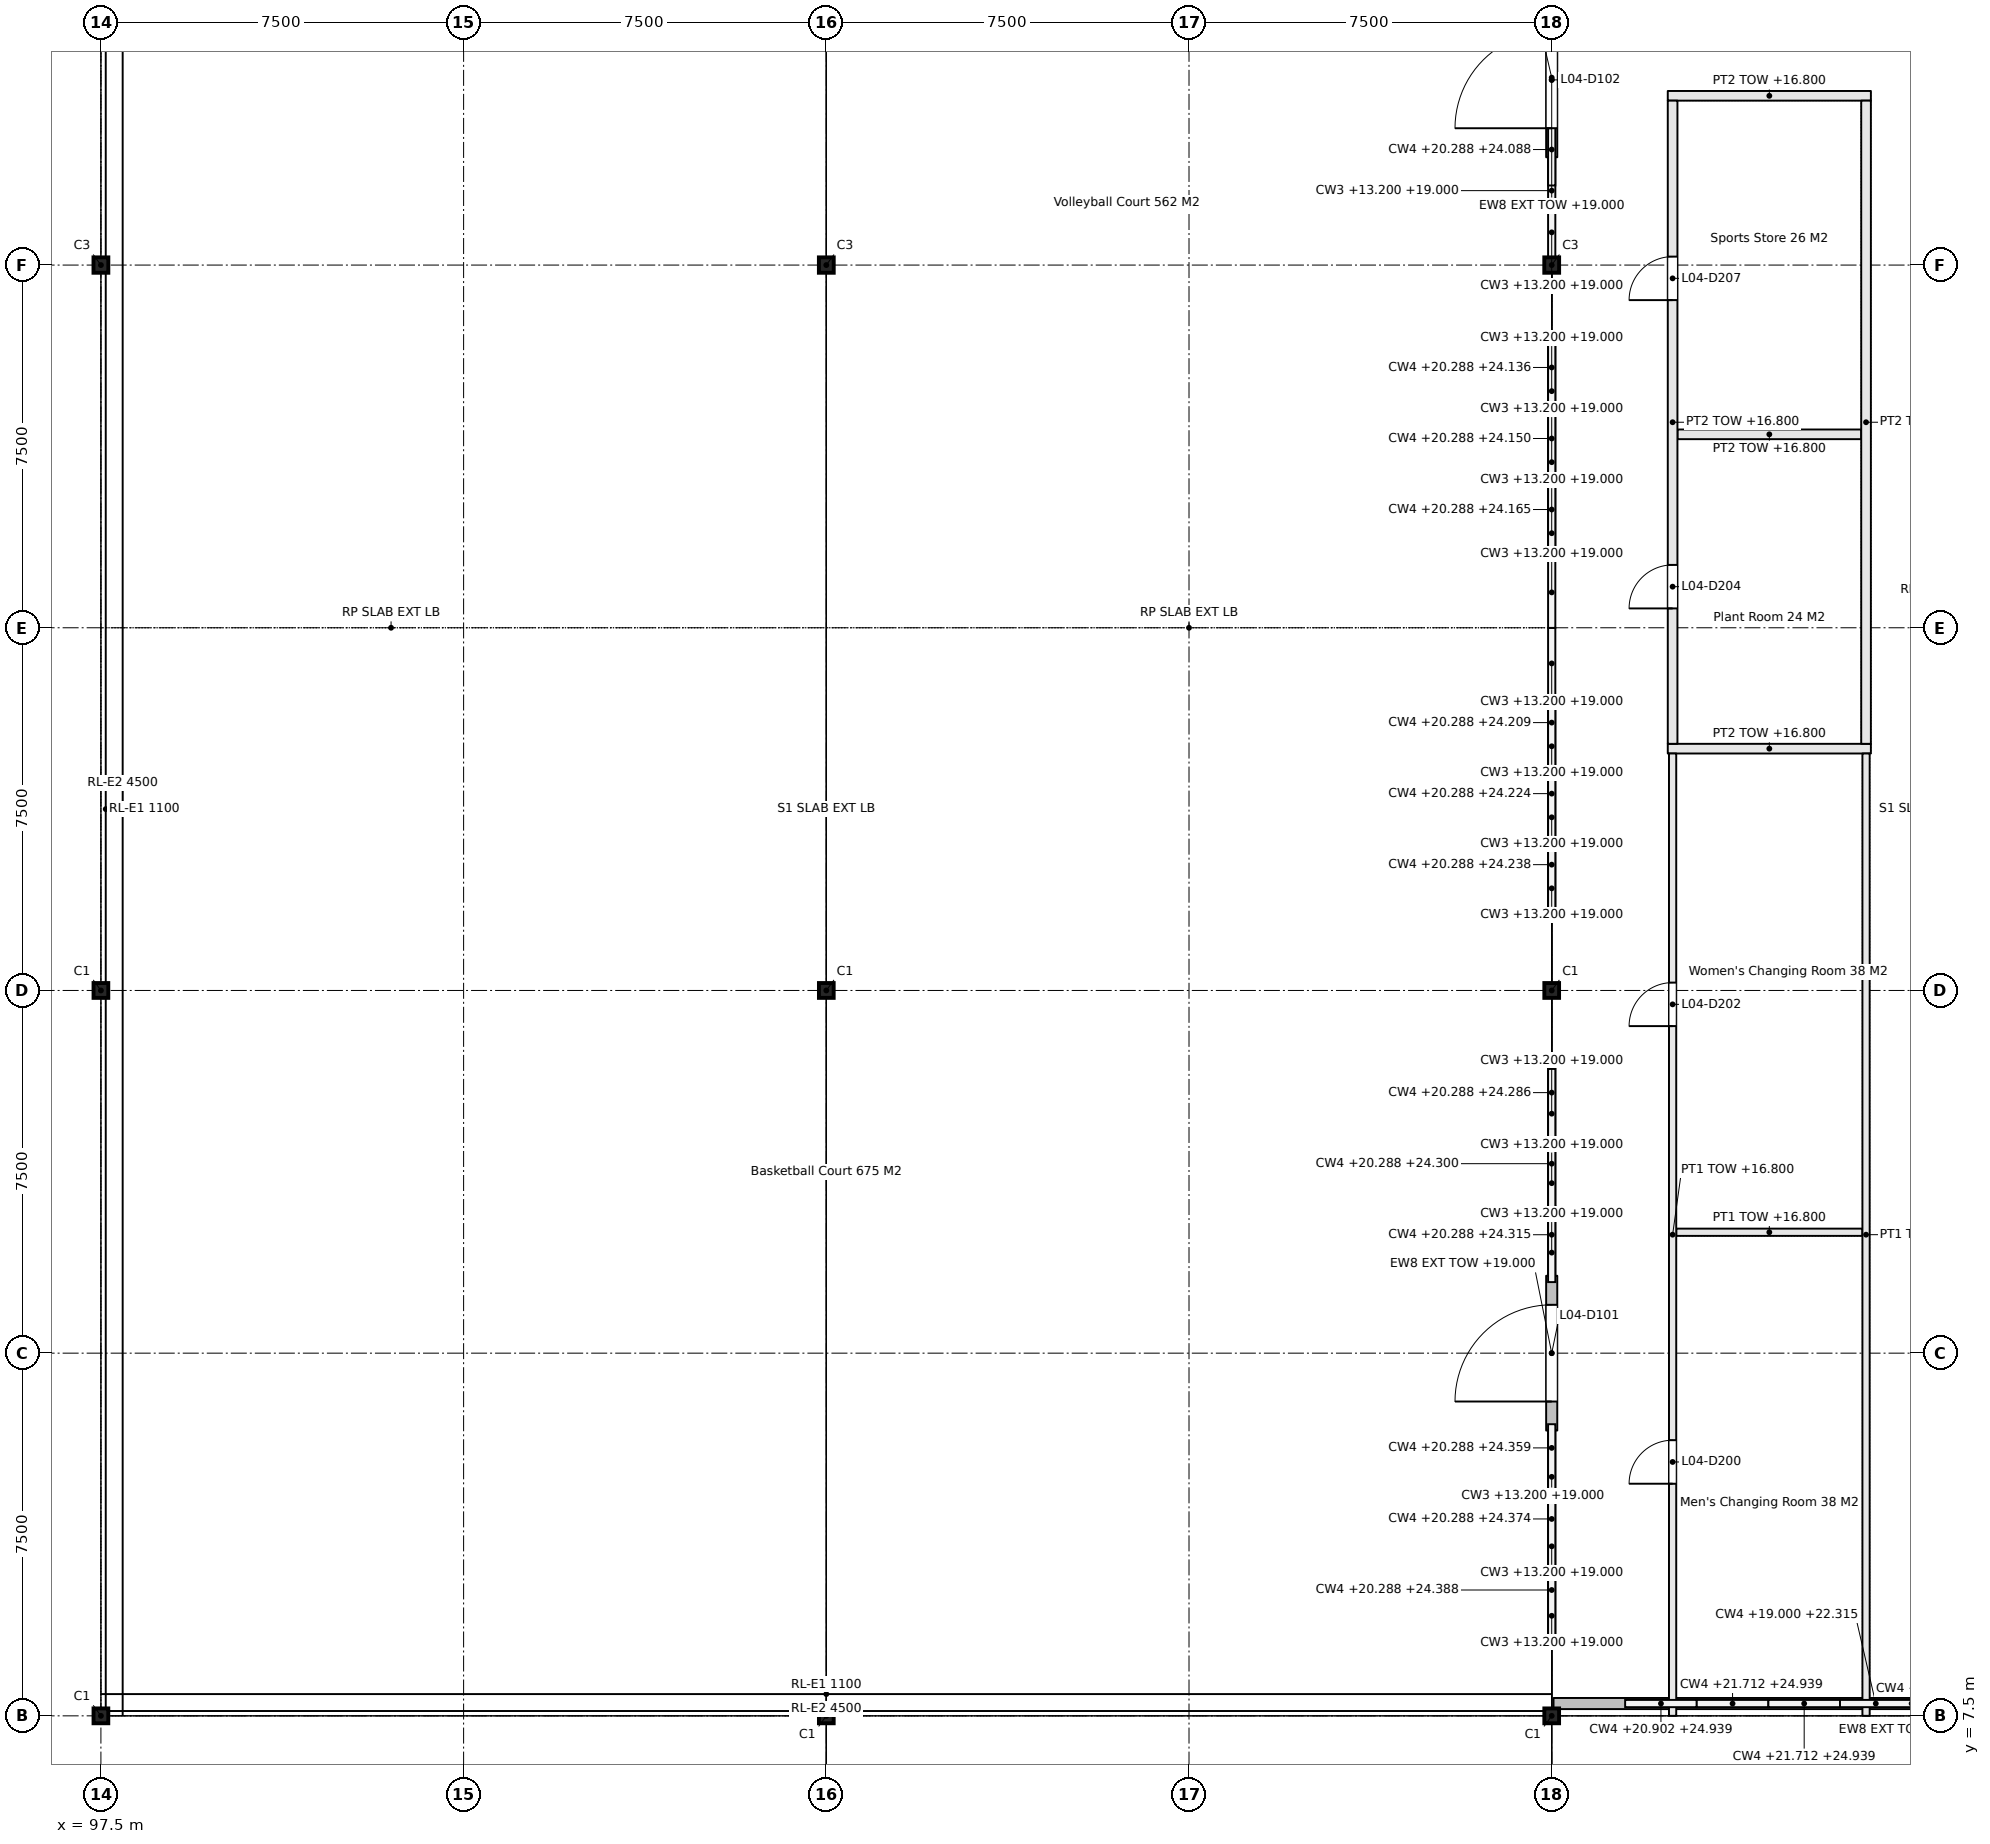
"""IFC4 building model, lengths in metres.
Left out: names, types, materials, properties, quantities, classifications, styles, units other than length and angle.
Written with IfcOpenShell. Run it as: python <this file> out.ifc"""

import sys

from ifc_helpers import new_model, si_unit, direction, frame, frame_2d, origin, origin_2d, place, context, subcontext, project, spatial, rectangle, i_section, extrude, element, fill, save


model = new_model("IFC4")
c1 = context("Model", 3, precision=1e-05, world=origin(), true_north=direction((0.0, 1.0)))
c2 = subcontext(c1, "Body", "Model", "MODEL_VIEW")
j1 = project(units=[si_unit("LENGTHUNIT", "METRE"), si_unit("PLANEANGLEUNIT", "RADIAN")], contexts=[c1])
p1 = place(None, origin())
s1 = spatial("IfcSite", under=j1, at=p1, CompositionType="ELEMENT")
p2 = place(p1, origin())
s2 = spatial("IfcBuilding", under=s1, at=p2, CompositionType="ELEMENT")
p3 = place(p2, frame((0.0, 0.0, 13.2)))
s3 = spatial("IfcBuildingStorey", under=s2, at=p3, CompositionType="ELEMENT", Elevation=13.2)
p4 = place(p3, frame((97.5, 7.5, 0.0), z_axis=(0.0, 0.0, 1.0), x_axis=(1.0, 0.0, 0.0)))
e1 = element("IfcColumn", 1, at=p4, inside=s3, PredefinedType="COLUMN", context=c2, shape_type="SweptSolid", body=[
    extrude(i_section(OverallWidth=0.305, OverallDepth=0.307, WebThickness=0.01, FlangeThickness=0.015, FilletRadius=0.015, at=origin_2d()), origin(), (0.0, 0.0, 1.0), 11.22),
])
p5 = place(p3, frame((97.5, 22.5, 0.0), z_axis=(0.0, 0.0, 1.0), x_axis=(1.0, 0.0, 0.0)))
e2 = element("IfcColumn", 2, at=p5, inside=s3, PredefinedType="COLUMN", context=c2, shape_type="SweptSolid", body=[
    extrude(i_section(OverallWidth=0.305, OverallDepth=0.307, WebThickness=0.01, FlangeThickness=0.015, FilletRadius=0.015, at=origin_2d()), origin(), (0.0, 0.0, 1.0), 11.07),
])
p6 = place(p3, frame((97.5, 37.5, 0.0), z_axis=(0.0, 0.0, 1.0), x_axis=(1.0, 0.0, 0.0)))
e3 = element("IfcColumn", 3, at=p6, inside=s3, PredefinedType="COLUMN", context=c2, shape_type="SweptSolid", body=[
    extrude(i_section(OverallWidth=0.307, OverallDepth=0.318, WebThickness=0.013, FlangeThickness=0.021, FilletRadius=0.015, at=origin_2d()), origin(), (0.0, 0.0, 1.0), 10.92),
])
p7 = place(p3, frame((112.5, 7.5, 0.0), z_axis=(0.0, 0.0, 1.0), x_axis=(1.0, 0.0, 0.0)))
e4 = element("IfcColumn", 4, at=p7, inside=s3, PredefinedType="COLUMN", context=c2, shape_type="SweptSolid", body=[
    extrude(i_section(OverallWidth=0.305, OverallDepth=0.307, WebThickness=0.01, FlangeThickness=0.015, FilletRadius=0.015, at=origin_2d()), origin(), (0.0, 0.0, 1.0), 7.47),
])
p8 = place(p3, frame((112.5, 22.5, 0.0), z_axis=(0.0, 0.0, 1.0), x_axis=(1.0, 0.0, 0.0)))
e5 = element("IfcColumn", 5, at=p8, inside=s3, PredefinedType="COLUMN", context=c2, shape_type="SweptSolid", body=[
    extrude(i_section(OverallWidth=0.305, OverallDepth=0.307, WebThickness=0.01, FlangeThickness=0.015, FilletRadius=0.015, at=origin_2d()), origin(), (0.0, 0.0, 1.0), 7.32),
])
p9 = place(p3, frame((112.5, 37.5, 0.0), z_axis=(0.0, 0.0, 1.0), x_axis=(1.0, 0.0, 0.0)))
e6 = element("IfcColumn", 6, at=p9, inside=s3, PredefinedType="COLUMN", context=c2, shape_type="SweptSolid", body=[
    extrude(i_section(OverallWidth=0.307, OverallDepth=0.318, WebThickness=0.013, FlangeThickness=0.021, FilletRadius=0.015, at=origin_2d()), origin(), (0.0, 0.0, 1.0), 7.17),
])
p10 = place(p3, frame((127.5, 7.5, 0.0), z_axis=(0.0, 0.0, 1.0), x_axis=(1.0, 0.0, 0.0)))
e7 = element("IfcColumn", 7, at=p10, inside=s3, PredefinedType="COLUMN", context=c2, shape_type="SweptSolid", body=[
    extrude(i_section(OverallWidth=0.305, OverallDepth=0.307, WebThickness=0.01, FlangeThickness=0.015, FilletRadius=0.015, at=origin_2d()), origin(), (0.0, 0.0, 1.0), 11.22),
])
p11 = place(p3, frame((127.5, 22.5, 0.0), z_axis=(0.0, 0.0, 1.0), x_axis=(1.0, 0.0, 0.0)))
e8 = element("IfcColumn", 8, at=p11, inside=s3, PredefinedType="COLUMN", context=c2, shape_type="SweptSolid", body=[
    extrude(i_section(OverallWidth=0.305, OverallDepth=0.307, WebThickness=0.01, FlangeThickness=0.015, FilletRadius=0.015, at=origin_2d()), origin(), (0.0, 0.0, 1.0), 11.07),
])
p12 = place(p3, frame((127.5, 37.5, 0.0), z_axis=(0.0, 0.0, 1.0), x_axis=(1.0, 0.0, 0.0)))
e9 = element("IfcColumn", 9, at=p12, inside=s3, PredefinedType="COLUMN", context=c2, shape_type="SweptSolid", body=[
    extrude(i_section(OverallWidth=0.307, OverallDepth=0.318, WebThickness=0.013, FlangeThickness=0.021, FilletRadius=0.015, at=origin_2d()), origin(), (0.0, 0.0, 1.0), 10.92),
])
p13 = place(p3, frame((130.075, 17.5, 0.0), z_axis=(0.0, 0.0, 1.0), x_axis=(1.0, 0.0, 0.0)))
e10 = element("IfcWall", 10, at=p13, inside=s3, PredefinedType="PARTITIONING", context=c2, shape_type="SweptSolid", body=[
    extrude(rectangle(XDim=3.85, YDim=0.15, at=frame_2d((1.925, 0.0))), origin(), (0.0, 0.0, 1.0), 3.6),
])
p14 = place(p3, frame((129.9, 27.5, 0.0), z_axis=(0.0, 0.0, 1.0), x_axis=(1.0, 0.0, 0.0)))
e11 = element("IfcWall", 11, at=p14, inside=s3, PredefinedType="PARTITIONING", context=c2, shape_type="SweptSolid", body=[
    extrude(rectangle(XDim=4.2, YDim=0.2, at=frame_2d((2.1, 0.0))), origin(), (0.0, 0.0, 1.0), 3.6),
])
p15 = place(p3, frame((130.1, 34.0, 0.0), z_axis=(0.0, 0.0, 1.0), x_axis=(1.0, 0.0, 0.0)))
e12 = element("IfcWall", 12, at=p15, inside=s3, PredefinedType="PARTITIONING", context=c2, shape_type="SweptSolid", body=[
    extrude(rectangle(XDim=3.8, YDim=0.2, at=frame_2d((1.9, 0.0))), origin(), (0.0, 0.0, 1.0), 3.6),
])
p16 = place(p3, frame((129.9, 41.0, 0.0), z_axis=(0.0, 0.0, 1.0), x_axis=(1.0, 0.0, 0.0)))
e13 = element("IfcWall", 13, at=p16, inside=s3, PredefinedType="PARTITIONING", context=c2, shape_type="SweptSolid", body=[
    extrude(rectangle(XDim=4.2, YDim=0.2, at=frame_2d((2.1, 0.0))), origin(), (0.0, 0.0, 1.0), 3.6),
])
p17 = place(p3, frame((130.0, 7.5, 0.0), z_axis=(0.0, 0.0, 1.0), x_axis=(0.0, 1.0, 0.0)))
e14 = element("IfcWall", 14, at=p17, inside=s3, PredefinedType="PARTITIONING", context=c2, shape_type="SweptSolid", body=[
    extrude(rectangle(XDim=19.9, YDim=0.15, at=frame_2d((9.95, 0.0))), origin(), (0.0, 0.0, 1.0), 3.6),
])
p18 = place(p17, frame((4.8, 0.0, 0.0)))
e15 = element("IfcOpeningElement", 15, at=p18, cuts=e14, PredefinedType="OPENING", context=c2, shape_type="SweptSolid", body=[
    extrude(rectangle(XDim=0.9, YDim=2.1, at=frame_2d((0.45, 1.05))), frame((0.0, 0.085, 0.0), z_axis=(0.0, -1.0, 0.0), x_axis=(1.0, 0.0, 0.0)), (0.0, 0.0, 1.0), 0.17),
])
p19 = place(p17, frame((14.263, 0.0, 0.0)))
e16 = element("IfcOpeningElement", 16, at=p19, cuts=e14, PredefinedType="OPENING", context=c2, shape_type="SweptSolid", body=[
    extrude(rectangle(XDim=0.9, YDim=2.1, at=frame_2d((0.45, 1.05))), frame((0.0, 0.085, 0.0), z_axis=(0.0, -1.0, 0.0), x_axis=(1.0, 0.0, 0.0)), (0.0, 0.0, 1.0), 0.17),
])
p20 = place(p3, frame((130.0, 27.6, 0.0), z_axis=(0.0, 0.0, 1.0), x_axis=(0.0, 1.0, 0.0)))
e17 = element("IfcWall", 17, at=p20, inside=s3, PredefinedType="PARTITIONING", context=c2, shape_type="SweptSolid", body=[
    extrude(rectangle(XDim=13.3, YDim=0.2, at=frame_2d((6.65, 0.0))), origin(), (0.0, 0.0, 1.0), 3.6),
])
p21 = place(p20, frame((2.8, 0.0, 0.0)))
e18 = element("IfcOpeningElement", 18, at=p21, cuts=e17, PredefinedType="OPENING", context=c2, shape_type="SweptSolid", body=[
    extrude(rectangle(XDim=0.9, YDim=2.1, at=frame_2d((0.45, 1.05))), frame((0.0, 0.11, 0.0), z_axis=(0.0, -1.0, 0.0), x_axis=(1.0, 0.0, 0.0)), (0.0, 0.0, 1.0), 0.22),
])
p22 = place(p20, frame((9.175, 0.0, 0.0)))
e19 = element("IfcOpeningElement", 19, at=p22, cuts=e17, PredefinedType="OPENING", context=c2, shape_type="SweptSolid", body=[
    extrude(rectangle(XDim=0.9, YDim=2.1, at=frame_2d((0.45, 1.05))), frame((0.0, 0.11, 0.0), z_axis=(0.0, -1.0, 0.0), x_axis=(1.0, 0.0, 0.0)), (0.0, 0.0, 1.0), 0.22),
])
p23 = place(p3, frame((134.0, 7.5, 0.0), z_axis=(0.0, 0.0, 1.0), x_axis=(0.0, 1.0, 0.0)))
e20 = element("IfcWall", 20, at=p23, inside=s3, PredefinedType="PARTITIONING", context=c2, shape_type="SweptSolid", body=[
    extrude(rectangle(XDim=19.9, YDim=0.15, at=frame_2d((9.95, 0.0))), origin(), (0.0, 0.0, 1.0), 3.6),
])
p24 = place(p3, frame((134.0, 27.6, 0.0), z_axis=(0.0, 0.0, 1.0), x_axis=(0.0, 1.0, 0.0)))
e21 = element("IfcWall", 21, at=p24, inside=s3, PredefinedType="PARTITIONING", context=c2, shape_type="SweptSolid", body=[
    extrude(rectangle(XDim=13.3, YDim=0.2, at=frame_2d((6.65, 0.0))), origin(), (0.0, 0.0, 1.0), 3.6),
])
p25 = place(p3, frame((127.5, 13.4, 0.0), z_axis=(0.0, 0.0, 1.0), x_axis=(0.0, 1.0, 0.0)))
e22 = element("IfcWall", 22, at=p25, inside=s3, PredefinedType="SOLIDWALL", context=c2, shape_type="SweptSolid", body=[
    extrude(rectangle(XDim=3.2, YDim=0.23, at=frame_2d((1.6, 0.0))), origin(), (0.0, 0.0, 1.0), 5.8),
])
p26 = place(p25, frame((0.6, 0.0, 0.0)))
e23 = element("IfcOpeningElement", 23, at=p26, cuts=e22, PredefinedType="OPENING", context=c2, shape_type="SweptSolid", body=[
    extrude(rectangle(XDim=2.0, YDim=2.4, at=frame_2d((1.0, 1.2))), frame((0.0, 0.125, 0.0), z_axis=(0.0, -1.0, 0.0), x_axis=(1.0, 0.0, 0.0)), (0.0, 0.0, 1.0), 0.25),
])
p27 = place(p3, frame((127.5, 39.729, 0.0), z_axis=(0.0, 0.0, 1.0), x_axis=(0.0, 1.0, 0.0)))
e24 = element("IfcWall", 24, at=p27, inside=s3, PredefinedType="SOLIDWALL", context=c2, shape_type="SweptSolid", body=[
    extrude(rectangle(XDim=3.2, YDim=0.23, at=frame_2d((1.6, 0.0))), origin(), (0.0, 0.0, 1.0), 5.8),
])
p28 = place(p27, frame((0.6, 0.0, 0.0)))
e25 = element("IfcOpeningElement", 25, at=p28, cuts=e24, PredefinedType="OPENING", context=c2, shape_type="SweptSolid", body=[
    extrude(rectangle(XDim=2.0, YDim=2.4, at=frame_2d((1.0, 1.2))), frame((0.0, 0.125, 0.0), z_axis=(0.0, -1.0, 0.0), x_axis=(1.0, 0.0, 0.0)), (0.0, 0.0, 1.0), 0.25),
])
p29 = place(p3, frame((127.538, 7.755, 0.0), z_axis=(0.0, 0.0, 1.0), x_axis=(1.0, 0.0, 0.0)))
e26 = element("IfcWall", 26, at=p29, inside=s3, PredefinedType="SOLIDWALL", context=c2, shape_type="SweptSolid", body=[
    extrude(rectangle(XDim=14.809, YDim=0.23, at=frame_2d((7.404, 0.0))), origin(), (0.0, 0.0, 1.0), 5.8),
])
p30 = place(p29, frame((10.357, 0.0, 0.9)))
e27 = element("IfcOpeningElement", 27, at=p30, cuts=e26, PredefinedType="OPENING", context=c2, shape_type="SweptSolid", body=[
    extrude(rectangle(XDim=3.0, YDim=1.5, at=frame_2d((1.5, 0.75))), frame((0.0, 0.125, 0.0), z_axis=(0.0, -1.0, 0.0), x_axis=(1.0, 0.0, 0.0)), (0.0, 0.0, 1.0), 0.25),
])
p31 = place(p18, origin())
e28 = element("IfcDoor", 28, at=p31, inside=s3, OperationType="SINGLE_SWING_LEFT", PredefinedType="DOOR", context=c2, shape_type="SweptSolid", body=[
    extrude(rectangle(XDim=0.9, YDim=2.1, at=frame_2d((0.45, 1.05))), frame((0.0, 0.025, 0.0), z_axis=(0.0, -1.0, 0.0), x_axis=(1.0, 0.0, 0.0)), (0.0, 0.0, 1.0), 0.05),
])
fill(e15, e28)
p32 = place(p19, origin())
e29 = element("IfcDoor", 29, at=p32, inside=s3, OperationType="SINGLE_SWING_RIGHT", PredefinedType="DOOR", context=c2, shape_type="SweptSolid", body=[
    extrude(rectangle(XDim=0.9, YDim=2.1, at=frame_2d((0.45, 1.05))), frame((0.0, 0.025, 0.0), z_axis=(0.0, -1.0, 0.0), x_axis=(1.0, 0.0, 0.0)), (0.0, 0.0, 1.0), 0.05),
])
fill(e16, e29)
p33 = place(p21, origin())
e30 = element("IfcDoor", 30, at=p33, inside=s3, OperationType="SINGLE_SWING_LEFT", PredefinedType="DOOR", context=c2, shape_type="SweptSolid", body=[
    extrude(rectangle(XDim=0.9, YDim=2.1, at=frame_2d((0.45, 1.05))), frame((0.0, 0.025, 0.0), z_axis=(0.0, -1.0, 0.0), x_axis=(1.0, 0.0, 0.0)), (0.0, 0.0, 1.0), 0.05),
])
fill(e18, e30)
p34 = place(p22, origin())
e31 = element("IfcDoor", 31, at=p34, inside=s3, OperationType="SINGLE_SWING_RIGHT", PredefinedType="DOOR", context=c2, shape_type="SweptSolid", body=[
    extrude(rectangle(XDim=0.9, YDim=2.1, at=frame_2d((0.45, 1.05))), frame((0.0, 0.025, 0.0), z_axis=(0.0, -1.0, 0.0), x_axis=(1.0, 0.0, 0.0)), (0.0, 0.0, 1.0), 0.05),
])
fill(e19, e31)
p35 = place(p26, origin())
e32 = element("IfcDoor", 32, at=p35, inside=s3, OperationType="DOUBLE_DOOR_SINGLE_SWING", PredefinedType="DOOR", context=c2, shape_type="SweptSolid", body=[
    extrude(rectangle(XDim=2.0, YDim=2.4, at=frame_2d((1.0, 1.2))), frame((0.0, 0.025, 0.0), z_axis=(0.0, -1.0, 0.0), x_axis=(1.0, 0.0, 0.0)), (0.0, 0.0, 1.0), 0.05),
])
fill(e23, e32)
p36 = place(p28, origin())
e33 = element("IfcDoor", 33, at=p36, inside=s3, OperationType="DOUBLE_DOOR_SINGLE_SWING", PredefinedType="DOOR", context=c2, shape_type="SweptSolid", body=[
    extrude(rectangle(XDim=2.0, YDim=2.4, at=frame_2d((1.0, 1.2))), frame((0.0, 0.025, 0.0), z_axis=(0.0, -1.0, 0.0), x_axis=(1.0, 0.0, 0.0)), (0.0, 0.0, 1.0), 0.05),
])
fill(e25, e33)
save(model, sys.argv[1])
